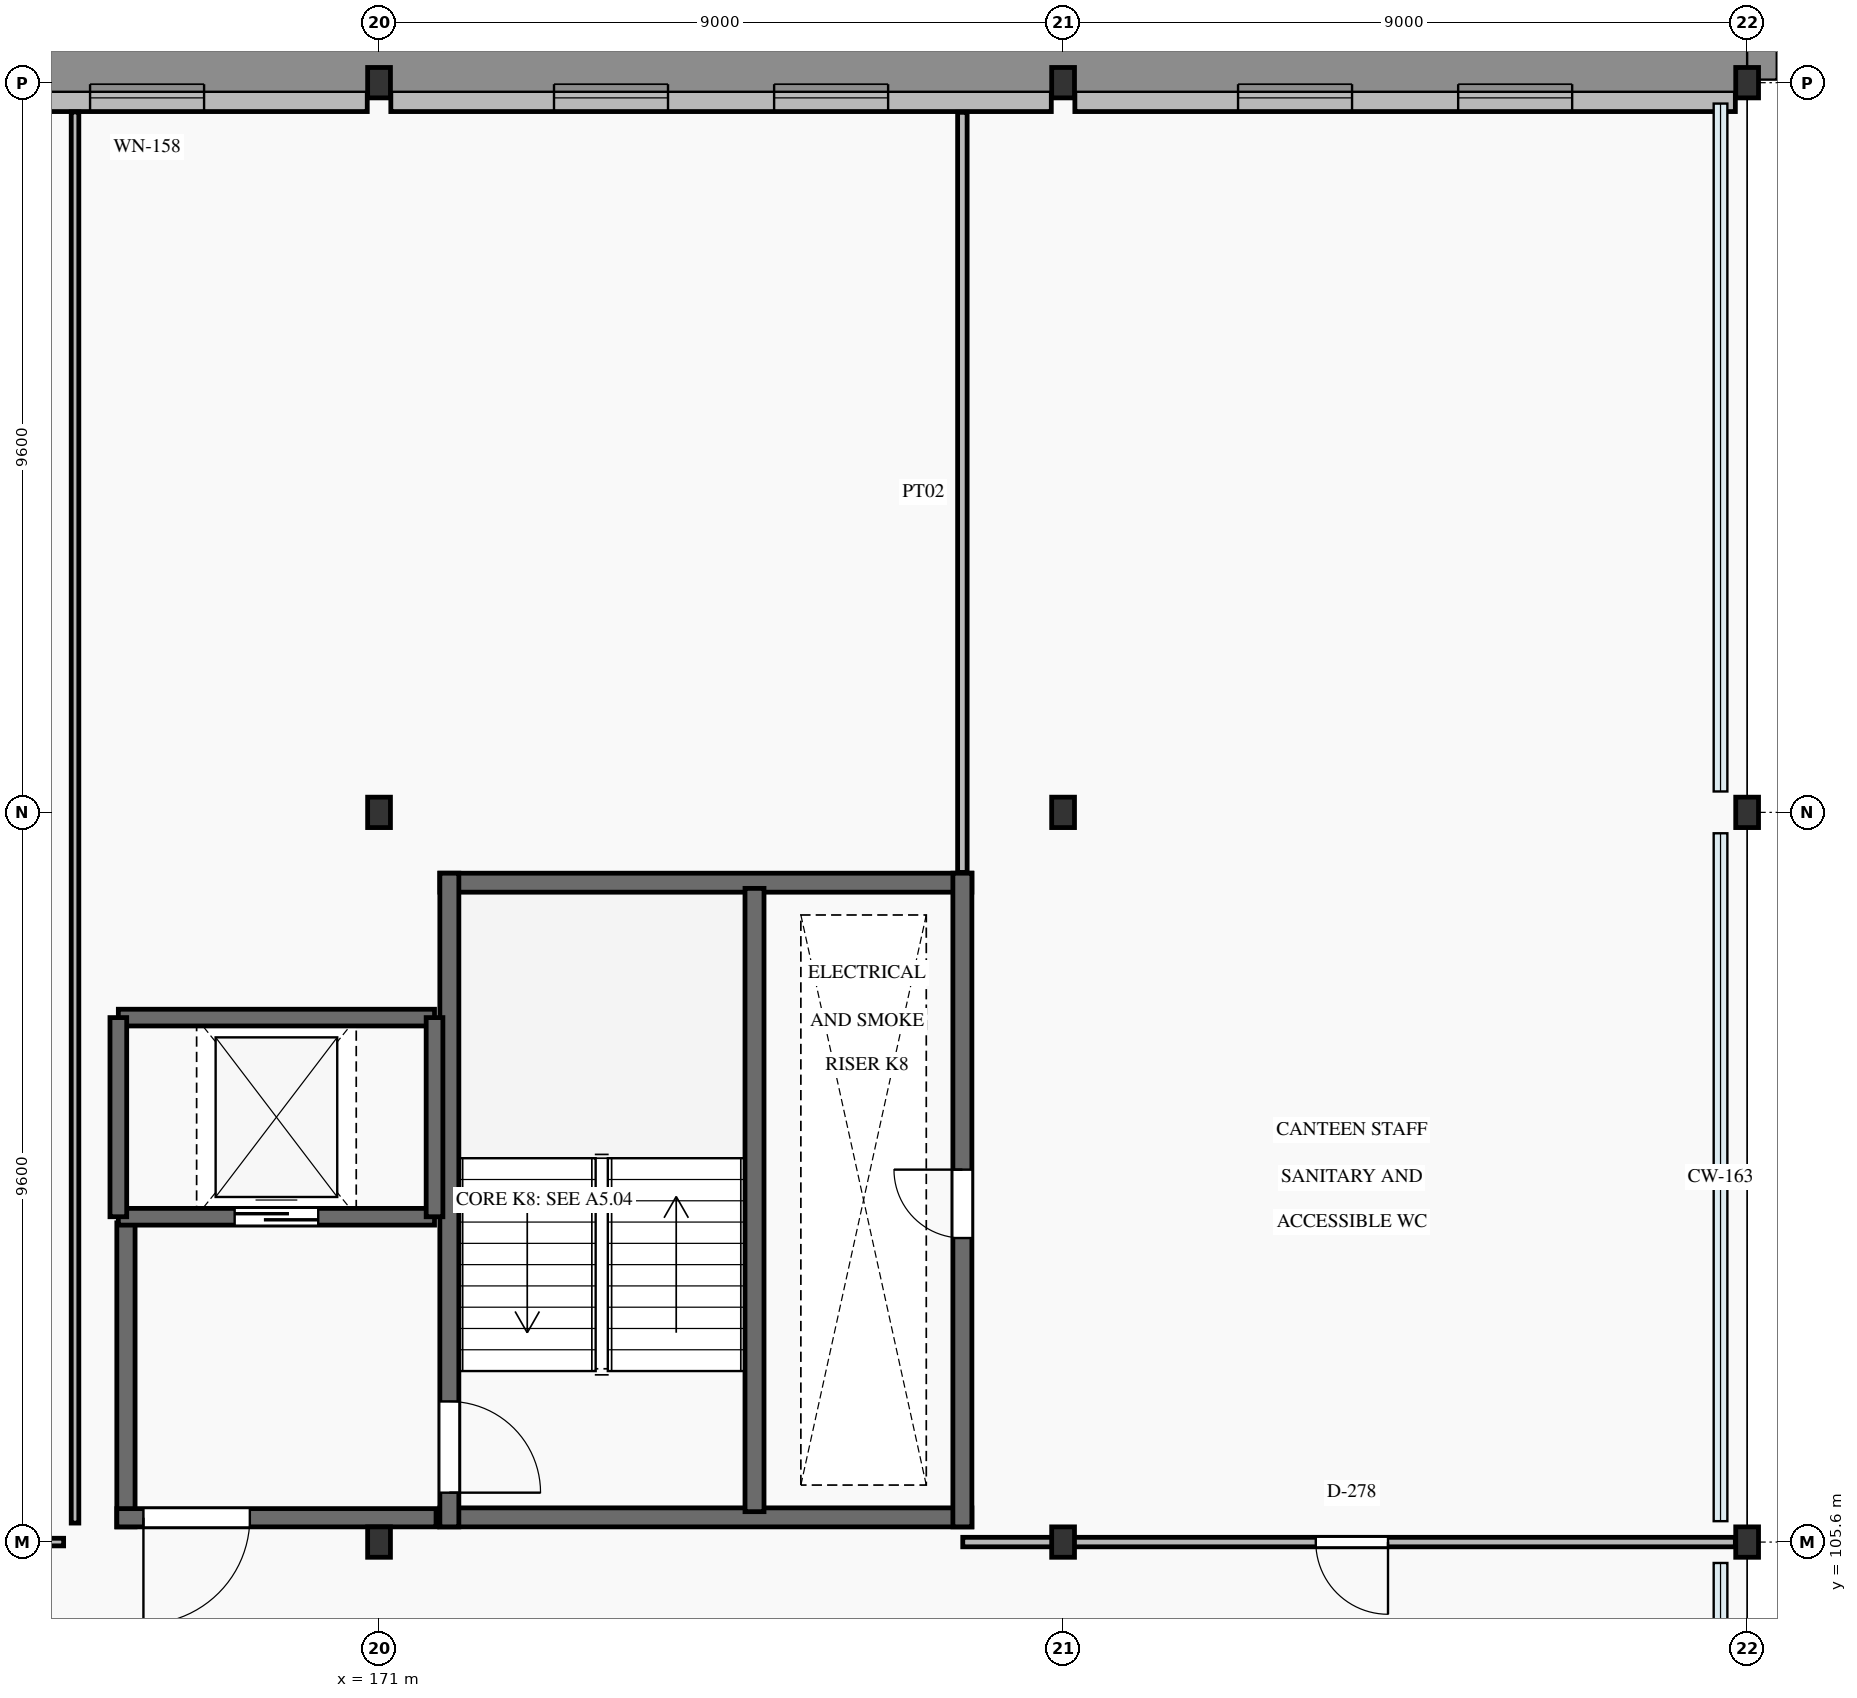
"""IFC4 building model, lengths in metres.
Left out: names, types, materials, properties, quantities, classifications, styles, units other than length and angle.
Written with IfcOpenShell. Run it as: python <this file> out.ifc"""

import sys

from ifc_helpers import new_model, si_unit, direction, frame, frame_2d, origin, origin_2d, place, context, subcontext, project, spatial, rectangle, i_section, extrude, element, fill, save


model = new_model("IFC4")
c1 = context("Model", 3, precision=1e-05, world=origin(), true_north=direction((0.0, 1.0)))
c2 = subcontext(c1, "Body", "Model", "MODEL_VIEW")
j1 = project(units=[si_unit("LENGTHUNIT", "METRE"), si_unit("PLANEANGLEUNIT", "RADIAN")], contexts=[c1])
p1 = place(None, origin())
s1 = spatial("IfcSite", under=j1, at=p1, CompositionType="ELEMENT")
p2 = place(p1, origin())
s2 = spatial("IfcBuilding", under=s1, at=p2, CompositionType="ELEMENT")
p3 = place(p2, frame((0.0, 0.0, 15.0)))
s3 = spatial("IfcBuildingStorey", under=s2, at=p3, CompositionType="ELEMENT", Elevation=15.0)
for number, where, z_axis, x_axis in (
    (1, (171.0, 105.6, 0.0), (0.0, 0.0, 1.0), (1.0, 0.0, 0.0)),
    (2, (171.0, 115.2, 0.0), (0.0, 0.0, 1.0), (1.0, 0.0, 0.0)),
    (3, (171.0, 124.8, 0.0), (0.0, 0.0, 1.0), (1.0, 0.0, 0.0)),
    (4, (180.0, 105.6, 0.0), (0.0, 0.0, 1.0), (1.0, 0.0, 0.0)),
    (5, (180.0, 115.2, 0.0), (0.0, 0.0, 1.0), (1.0, 0.0, 0.0)),
    (6, (180.0, 124.8, 0.0), (0.0, 0.0, 1.0), (1.0, 0.0, 0.0)),
    (7, (189.0, 105.6, 0.0), (0.0, 0.0, 1.0), (1.0, 0.0, 0.0)),
    (8, (189.0, 115.2, 0.0), (0.0, 0.0, 1.0), (1.0, 0.0, 0.0)),
    (9, (189.0, 124.8, 0.0), (0.0, 0.0, 1.0), (1.0, 0.0, 0.0)),
):
    element("IfcColumn", number, at=place(p3, frame(where, z_axis=z_axis, x_axis=x_axis)), inside=s3, PredefinedType="COLUMN", context=c2, shape_type="SweptSolid", body=[
        extrude(i_section(OverallWidth=0.3, OverallDepth=0.4, WebThickness=0.013, FlangeThickness=0.024, FilletRadius=0.027, at=origin_2d()), origin(), (0.0, 0.0, 1.0), 3.9),
    ])
p4 = place(p3, frame((162.155, 124.6, 0.0), z_axis=(0.0, 0.0, 1.0), x_axis=(1.0, 0.0, 0.0)))
e10 = element("IfcWall", 10, at=p4, inside=s3, PredefinedType="SOLIDWALL", context=c2, shape_type="SweptSolid", body=[
    extrude(rectangle(XDim=8.69, YDim=0.36, at=frame_2d((4.345, 0.0))), origin(), (0.0, 0.0, 1.0), 3.36),
])
p5 = place(p4, frame((2.147, 0.0, 0.95)))
e11 = element("IfcOpeningElement", 11, at=p5, cuts=e10, PredefinedType="OPENING", context=c2, shape_type="SweptSolid", body=[
    extrude(rectangle(XDim=1.5, YDim=2.1, at=frame_2d((0.75, 1.05))), frame((0.0, 0.195, 0.0), z_axis=(0.0, -1.0, 0.0), x_axis=(1.0, 0.0, 0.0)), (0.0, 0.0, 1.0), 0.39),
])
p6 = place(p4, frame((5.043, 0.0, 0.95)))
e12 = element("IfcOpeningElement", 12, at=p6, cuts=e10, PredefinedType="OPENING", context=c2, shape_type="SweptSolid", body=[
    extrude(rectangle(XDim=1.5, YDim=2.1, at=frame_2d((0.75, 1.05))), frame((0.0, 0.195, 0.0), z_axis=(0.0, -1.0, 0.0), x_axis=(1.0, 0.0, 0.0)), (0.0, 0.0, 1.0), 0.39),
])
p7 = place(p3, frame((171.155, 124.6, 0.0), z_axis=(0.0, 0.0, 1.0), x_axis=(1.0, 0.0, 0.0)))
e13 = element("IfcWall", 13, at=p7, inside=s3, PredefinedType="SOLIDWALL", context=c2, shape_type="SweptSolid", body=[
    extrude(rectangle(XDim=8.69, YDim=0.36, at=frame_2d((4.345, 0.0))), origin(), (0.0, 0.0, 1.0), 3.36),
])
p8 = place(p7, frame((2.147, 0.0, 0.95)))
e14 = element("IfcOpeningElement", 14, at=p8, cuts=e13, PredefinedType="OPENING", context=c2, shape_type="SweptSolid", body=[
    extrude(rectangle(XDim=1.5, YDim=2.1, at=frame_2d((0.75, 1.05))), frame((0.0, 0.195, 0.0), z_axis=(0.0, -1.0, 0.0), x_axis=(1.0, 0.0, 0.0)), (0.0, 0.0, 1.0), 0.39),
])
p9 = place(p7, frame((5.043, 0.0, 0.95)))
e15 = element("IfcOpeningElement", 15, at=p9, cuts=e13, PredefinedType="OPENING", context=c2, shape_type="SweptSolid", body=[
    extrude(rectangle(XDim=1.5, YDim=2.1, at=frame_2d((0.75, 1.05))), frame((0.0, 0.195, 0.0), z_axis=(0.0, -1.0, 0.0), x_axis=(1.0, 0.0, 0.0)), (0.0, 0.0, 1.0), 0.39),
])
p10 = place(p3, frame((180.155, 124.6, 0.0), z_axis=(0.0, 0.0, 1.0), x_axis=(1.0, 0.0, 0.0)))
e16 = element("IfcWall", 16, at=p10, inside=s3, PredefinedType="SOLIDWALL", context=c2, shape_type="SweptSolid", body=[
    extrude(rectangle(XDim=8.69, YDim=0.36, at=frame_2d((4.345, 0.0))), origin(), (0.0, 0.0, 1.0), 3.36),
])
p11 = place(p10, frame((2.147, 0.0, 0.95)))
e17 = element("IfcOpeningElement", 17, at=p11, cuts=e16, PredefinedType="OPENING", context=c2, shape_type="SweptSolid", body=[
    extrude(rectangle(XDim=1.5, YDim=2.1, at=frame_2d((0.75, 1.05))), frame((0.0, 0.195, 0.0), z_axis=(0.0, -1.0, 0.0), x_axis=(1.0, 0.0, 0.0)), (0.0, 0.0, 1.0), 0.39),
])
p12 = place(p10, frame((5.043, 0.0, 0.95)))
e18 = element("IfcOpeningElement", 18, at=p12, cuts=e16, PredefinedType="OPENING", context=c2, shape_type="SweptSolid", body=[
    extrude(rectangle(XDim=1.5, YDim=2.1, at=frame_2d((0.75, 1.05))), frame((0.0, 0.195, 0.0), z_axis=(0.0, -1.0, 0.0), x_axis=(1.0, 0.0, 0.0)), (0.0, 0.0, 1.0), 0.39),
])
for number, where, z_axis, x_axis in (
    (19, (171.8, 105.925, 0.0), (0.0, 0.0, 1.0), (1.0, 0.0, 0.0)),
    (20, (171.8, 114.275, 0.0), (0.0, 0.0, 1.0), (1.0, 0.0, 0.0)),
):
    element("IfcWall", number, at=place(p3, frame(where, z_axis=z_axis, x_axis=x_axis)), inside=s3, PredefinedType="SHEAR", context=c2, shape_type="SweptSolid", body=[
        extrude(rectangle(XDim=7.0, YDim=0.25, at=frame_2d((3.5, 0.0))), origin(), (0.0, 0.0, 1.0), 3.9),
    ])
p13 = place(p3, frame((171.925, 105.8, 0.0), z_axis=(0.0, 0.0, 1.0), x_axis=(0.0, 1.0, 0.0)))
e21 = element("IfcWall", 21, at=p13, inside=s3, PredefinedType="SHEAR", context=c2, shape_type="SweptSolid", body=[
    extrude(rectangle(XDim=8.6, YDim=0.25, at=frame_2d((4.3, 0.0))), origin(), (0.0, 0.0, 1.0), 3.9),
])
p14 = place(p13, frame((0.45, 0.0, 0.0)))
e22 = element("IfcOpeningElement", 22, at=p14, cuts=e21, PredefinedType="OPENING", context=c2, shape_type="SweptSolid", body=[
    extrude(rectangle(XDim=1.2, YDim=2.15, at=frame_2d((0.6, 1.075))), frame((0.0, 0.14, 0.0), z_axis=(0.0, -1.0, 0.0), x_axis=(1.0, 0.0, 0.0)), (0.0, 0.0, 1.0), 0.28),
])
p15 = place(p3, frame((178.675, 105.8, 0.0), z_axis=(0.0, 0.0, 1.0), x_axis=(0.0, 1.0, 0.0)))
e23 = element("IfcWall", 23, at=p15, inside=s3, PredefinedType="SHEAR", context=c2, shape_type="SweptSolid", body=[
    extrude(rectangle(XDim=8.6, YDim=0.25, at=frame_2d((4.3, 0.0))), origin(), (0.0, 0.0, 1.0), 3.9),
])
p16 = place(p15, frame((3.8, 0.0, 0.0)))
e24 = element("IfcOpeningElement", 24, at=p16, cuts=e23, PredefinedType="OPENING", context=c2, shape_type="SweptSolid", body=[
    extrude(rectangle(XDim=0.9, YDim=2.05, at=frame_2d((0.45, 1.025))), frame((0.0, 0.14, 0.0), z_axis=(0.0, -1.0, 0.0), x_axis=(1.0, 0.0, 0.0)), (0.0, 0.0, 1.0), 0.28),
])
p17 = place(p3, frame((175.94, 106.0, 0.0), z_axis=(0.0, 0.0, 1.0), x_axis=(0.0, 1.0, 0.0)))
e25 = element("IfcWall", 25, at=p17, inside=s3, PredefinedType="SHEAR", context=c2, shape_type="SweptSolid", body=[
    extrude(rectangle(XDim=8.2, YDim=0.25, at=frame_2d((4.1, 0.0))), origin(), (0.0, 0.0, 1.0), 3.9),
])
p18 = place(p3, frame((167.67, 105.8, 0.0), z_axis=(0.0, 0.0, 1.0), x_axis=(0.0, 1.0, 0.0)))
e26 = element("IfcWall", 26, at=p18, inside=s3, PredefinedType="SHEAR", context=c2, shape_type="SweptSolid", body=[
    extrude(rectangle(XDim=4.0, YDim=0.24, at=frame_2d((2.0, 0.0))), origin(), (0.0, 0.0, 1.0), 3.9),
])
p19 = place(p3, frame((167.55, 105.92, 0.0), z_axis=(0.0, 0.0, 1.0), x_axis=(1.0, 0.0, 0.0)))
e27 = element("IfcWall", 27, at=p19, inside=s3, PredefinedType="SHEAR", context=c2, shape_type="SweptSolid", body=[
    extrude(rectangle(XDim=4.2, YDim=0.24, at=frame_2d((2.1, 0.0))), origin(), (0.0, 0.0, 1.0), 3.9),
])
p20 = place(p19, frame((0.35, 0.0, 0.0)))
e28 = element("IfcOpeningElement", 28, at=p20, cuts=e27, PredefinedType="OPENING", context=c2, shape_type="SweptSolid", body=[
    extrude(rectangle(XDim=1.4, YDim=2.2, at=frame_2d((0.7, 1.1))), frame((0.0, 0.135, 0.0), z_axis=(0.0, -1.0, 0.0), x_axis=(1.0, 0.0, 0.0)), (0.0, 0.0, 1.0), 0.27),
])
p21 = place(p3, frame((167.57, 109.88, 0.0), z_axis=(0.0, 0.0, 1.0), x_axis=(1.0, 0.0, 0.0)))
e29 = element("IfcWall", 29, at=p21, inside=s3, PredefinedType="SHEAR", context=c2, shape_type="SweptSolid", body=[
    extrude(rectangle(XDim=4.16, YDim=0.22, at=frame_2d((2.08, 0.0))), origin(), (0.0, 0.0, 1.0), 3.9),
])
p22 = place(p21, frame((1.53, 0.0, 0.0)))
e30 = element("IfcOpeningElement", 30, at=p22, cuts=e29, PredefinedType="OPENING", context=c2, shape_type="SweptSolid", body=[
    extrude(rectangle(XDim=1.1, YDim=2.15, at=frame_2d((0.55, 1.075))), frame((0.0, 0.125, 0.0), z_axis=(0.0, -1.0, 0.0), x_axis=(1.0, 0.0, 0.0)), (0.0, 0.0, 1.0), 0.25),
])
p23 = place(p3, frame((167.57, 112.5, 0.0), z_axis=(0.0, 0.0, 1.0), x_axis=(1.0, 0.0, 0.0)))
e31 = element("IfcWall", 31, at=p23, inside=s3, PredefinedType="SHEAR", context=c2, shape_type="SweptSolid", body=[
    extrude(rectangle(XDim=4.16, YDim=0.22, at=frame_2d((2.08, 0.0))), origin(), (0.0, 0.0, 1.0), 3.9),
])
for number, where, z_axis, x_axis in (
    (32, (167.57, 109.88, 0.0), (0.0, 0.0, 1.0), (0.0, 1.0, 0.0)),
    (33, (171.73, 109.88, 0.0), (0.0, 0.0, 1.0), (0.0, 1.0, 0.0)),
):
    element("IfcWall", number, at=place(p3, frame(where, z_axis=z_axis, x_axis=x_axis)), inside=s3, PredefinedType="SHEAR", context=c2, shape_type="SweptSolid", body=[
        extrude(rectangle(XDim=2.62, YDim=0.22, at=frame_2d((1.31, 0.0))), origin(), (0.0, 0.0, 1.0), 3.9),
    ])
p24 = place(p3, frame((160.96, 105.6, 0.0), z_axis=(0.0, 0.0, 1.0), x_axis=(1.0, 0.0, 0.0)))
e34 = element("IfcWall", 34, at=p24, inside=s3, PredefinedType="PARTITIONING", context=c2, shape_type="SweptSolid", body=[
    extrude(rectangle(XDim=5.89, YDim=0.1, at=frame_2d((2.945, 0.0))), origin(), (0.0, 0.0, 1.0), 3.29),
])
p25 = place(p24, frame((2.845, 0.0, 0.0)))
e35 = element("IfcOpeningElement", 35, at=p25, cuts=e34, PredefinedType="OPENING", context=c2, shape_type="SweptSolid", body=[
    extrude(rectangle(XDim=1.6, YDim=2.25, at=frame_2d((0.8, 1.125))), frame((0.0, 0.065, 0.0), z_axis=(0.0, -1.0, 0.0), x_axis=(1.0, 0.0, 0.0)), (0.0, 0.0, 1.0), 0.13),
])
p26 = place(p3, frame((178.68, 105.6, 0.0), z_axis=(0.0, 0.0, 1.0), x_axis=(1.0, 0.0, 0.0)))
e36 = element("IfcWall", 36, at=p26, inside=s3, PredefinedType="PARTITIONING", context=c2, shape_type="SweptSolid", body=[
    extrude(rectangle(XDim=10.165, YDim=0.125, at=frame_2d((5.083, 0.0))), origin(), (0.0, 0.0, 1.0), 3.29),
])
p27 = place(p26, frame((4.645, 0.0, 0.0)))
e37 = element("IfcOpeningElement", 37, at=p27, cuts=e36, PredefinedType="OPENING", context=c2, shape_type="SweptSolid", body=[
    extrude(rectangle(XDim=0.95, YDim=2.1, at=frame_2d((0.475, 1.05))), frame((0.0, 0.077, 0.0), z_axis=(0.0, -1.0, 0.0), x_axis=(1.0, 0.0, 0.0)), (0.0, 0.0, 1.0), 0.155),
])
p28 = place(p3, frame((167.0, 105.85, 0.0), z_axis=(0.0, 0.0, 1.0), x_axis=(0.0, 1.0, 0.0)))
e38 = element("IfcWall", 38, at=p28, inside=s3, PredefinedType="PARTITIONING", context=c2, shape_type="SweptSolid", body=[
    extrude(rectangle(XDim=18.565, YDim=0.1, at=frame_2d((9.282, 0.0))), origin(), (0.0, 0.0, 1.0), 3.64),
])
p29 = place(p3, frame((178.675, 114.41, 0.0), z_axis=(0.0, 0.0, 1.0), x_axis=(0.0, 1.0, 0.0)))
e39 = element("IfcWall", 39, at=p29, inside=s3, PredefinedType="PARTITIONING", context=c2, shape_type="SweptSolid", body=[
    extrude(rectangle(XDim=10.0, YDim=0.125, at=frame_2d((5.0, 0.0))), origin(), (0.0, 0.0, 1.0), 3.64),
])
p30 = place(p6, origin())
e40 = element("IfcWindow", 40, at=p30, inside=s3, PartitioningType="SINGLE_PANEL", PredefinedType="WINDOW", context=c2, shape_type="SweptSolid", body=[
    extrude(rectangle(XDim=1.5, YDim=2.1, at=frame_2d((0.75, 1.05))), frame((0.0, 0.03, 0.0), z_axis=(0.0, -1.0, 0.0), x_axis=(1.0, 0.0, 0.0)), (0.0, 0.0, 1.0), 0.06),
])
fill(e12, e40)
p31 = place(p8, origin())
e41 = element("IfcWindow", 41, at=p31, inside=s3, PartitioningType="SINGLE_PANEL", PredefinedType="WINDOW", context=c2, shape_type="SweptSolid", body=[
    extrude(rectangle(XDim=1.5, YDim=2.1, at=frame_2d((0.75, 1.05))), frame((0.0, 0.03, 0.0), z_axis=(0.0, -1.0, 0.0), x_axis=(1.0, 0.0, 0.0)), (0.0, 0.0, 1.0), 0.06),
])
fill(e14, e41)
p32 = place(p9, origin())
e42 = element("IfcWindow", 42, at=p32, inside=s3, PartitioningType="SINGLE_PANEL", PredefinedType="WINDOW", context=c2, shape_type="SweptSolid", body=[
    extrude(rectangle(XDim=1.5, YDim=2.1, at=frame_2d((0.75, 1.05))), frame((0.0, 0.03, 0.0), z_axis=(0.0, -1.0, 0.0), x_axis=(1.0, 0.0, 0.0)), (0.0, 0.0, 1.0), 0.06),
])
fill(e15, e42)
p33 = place(p11, origin())
e43 = element("IfcWindow", 43, at=p33, inside=s3, PartitioningType="SINGLE_PANEL", PredefinedType="WINDOW", context=c2, shape_type="SweptSolid", body=[
    extrude(rectangle(XDim=1.5, YDim=2.1, at=frame_2d((0.75, 1.05))), frame((0.0, 0.03, 0.0), z_axis=(0.0, -1.0, 0.0), x_axis=(1.0, 0.0, 0.0)), (0.0, 0.0, 1.0), 0.06),
])
fill(e17, e43)
p34 = place(p12, origin())
e44 = element("IfcWindow", 44, at=p34, inside=s3, PartitioningType="SINGLE_PANEL", PredefinedType="WINDOW", context=c2, shape_type="SweptSolid", body=[
    extrude(rectangle(XDim=1.5, YDim=2.1, at=frame_2d((0.75, 1.05))), frame((0.0, 0.03, 0.0), z_axis=(0.0, -1.0, 0.0), x_axis=(1.0, 0.0, 0.0)), (0.0, 0.0, 1.0), 0.06),
])
fill(e18, e44)
p35 = place(p14, frame((1.2, 0.0, 0.0), z_axis=(0.0, 0.0, 1.0), x_axis=(-1.0, 0.0, 0.0)))
e45 = element("IfcDoor", 45, at=p35, inside=s3, OperationType="SINGLE_SWING_LEFT", PredefinedType="DOOR", context=c2, shape_type="SweptSolid", body=[
    extrude(rectangle(XDim=1.2, YDim=2.15, at=frame_2d((0.6, 1.075))), frame((0.0, 0.025, 0.0), z_axis=(0.0, -1.0, 0.0), x_axis=(1.0, 0.0, 0.0)), (0.0, 0.0, 1.0), 0.05),
])
fill(e22, e45)
p36 = place(p16, origin())
e46 = element("IfcDoor", 46, at=p36, inside=s3, OperationType="SINGLE_SWING_RIGHT", PredefinedType="DOOR", context=c2, shape_type="SweptSolid", body=[
    extrude(rectangle(XDim=0.9, YDim=2.05, at=frame_2d((0.45, 1.025))), frame((0.0, 0.025, 0.0), z_axis=(0.0, -1.0, 0.0), x_axis=(1.0, 0.0, 0.0)), (0.0, 0.0, 1.0), 0.05),
])
fill(e24, e46)
p37 = place(p20, frame((1.4, 0.0, 0.0), z_axis=(0.0, 0.0, 1.0), x_axis=(-1.0, 0.0, 0.0)))
e47 = element("IfcDoor", 47, at=p37, inside=s3, OperationType="SINGLE_SWING_LEFT", PredefinedType="DOOR", context=c2, shape_type="SweptSolid", body=[
    extrude(rectangle(XDim=1.4, YDim=2.2, at=frame_2d((0.7, 1.1))), frame((0.0, 0.025, 0.0), z_axis=(0.0, -1.0, 0.0), x_axis=(1.0, 0.0, 0.0)), (0.0, 0.0, 1.0), 0.05),
])
fill(e28, e47)
p38 = place(p22, origin())
e48 = element("IfcDoor", 48, at=p38, inside=s3, OperationType="SLIDING_TO_RIGHT", PredefinedType="DOOR", context=c2, shape_type="SweptSolid", body=[
    extrude(rectangle(XDim=1.1, YDim=2.15, at=frame_2d((0.55, 1.075))), frame((0.0, 0.025, 0.0), z_axis=(0.0, -1.0, 0.0), x_axis=(1.0, 0.0, 0.0)), (0.0, 0.0, 1.0), 0.05),
])
fill(e30, e48)
p39 = place(p27, frame((0.95, 0.0, 0.0), z_axis=(0.0, 0.0, 1.0), x_axis=(-1.0, 0.0, 0.0)))
e49 = element("IfcDoor", 49, at=p39, inside=s3, OperationType="SINGLE_SWING_RIGHT", PredefinedType="DOOR", context=c2, shape_type="SweptSolid", body=[
    extrude(rectangle(XDim=0.95, YDim=2.1, at=frame_2d((0.475, 1.05))), frame((0.0, 0.025, 0.0), z_axis=(0.0, -1.0, 0.0), x_axis=(1.0, 0.0, 0.0)), (0.0, 0.0, 1.0), 0.05),
])
fill(e37, e49)
save(model, sys.argv[1])
